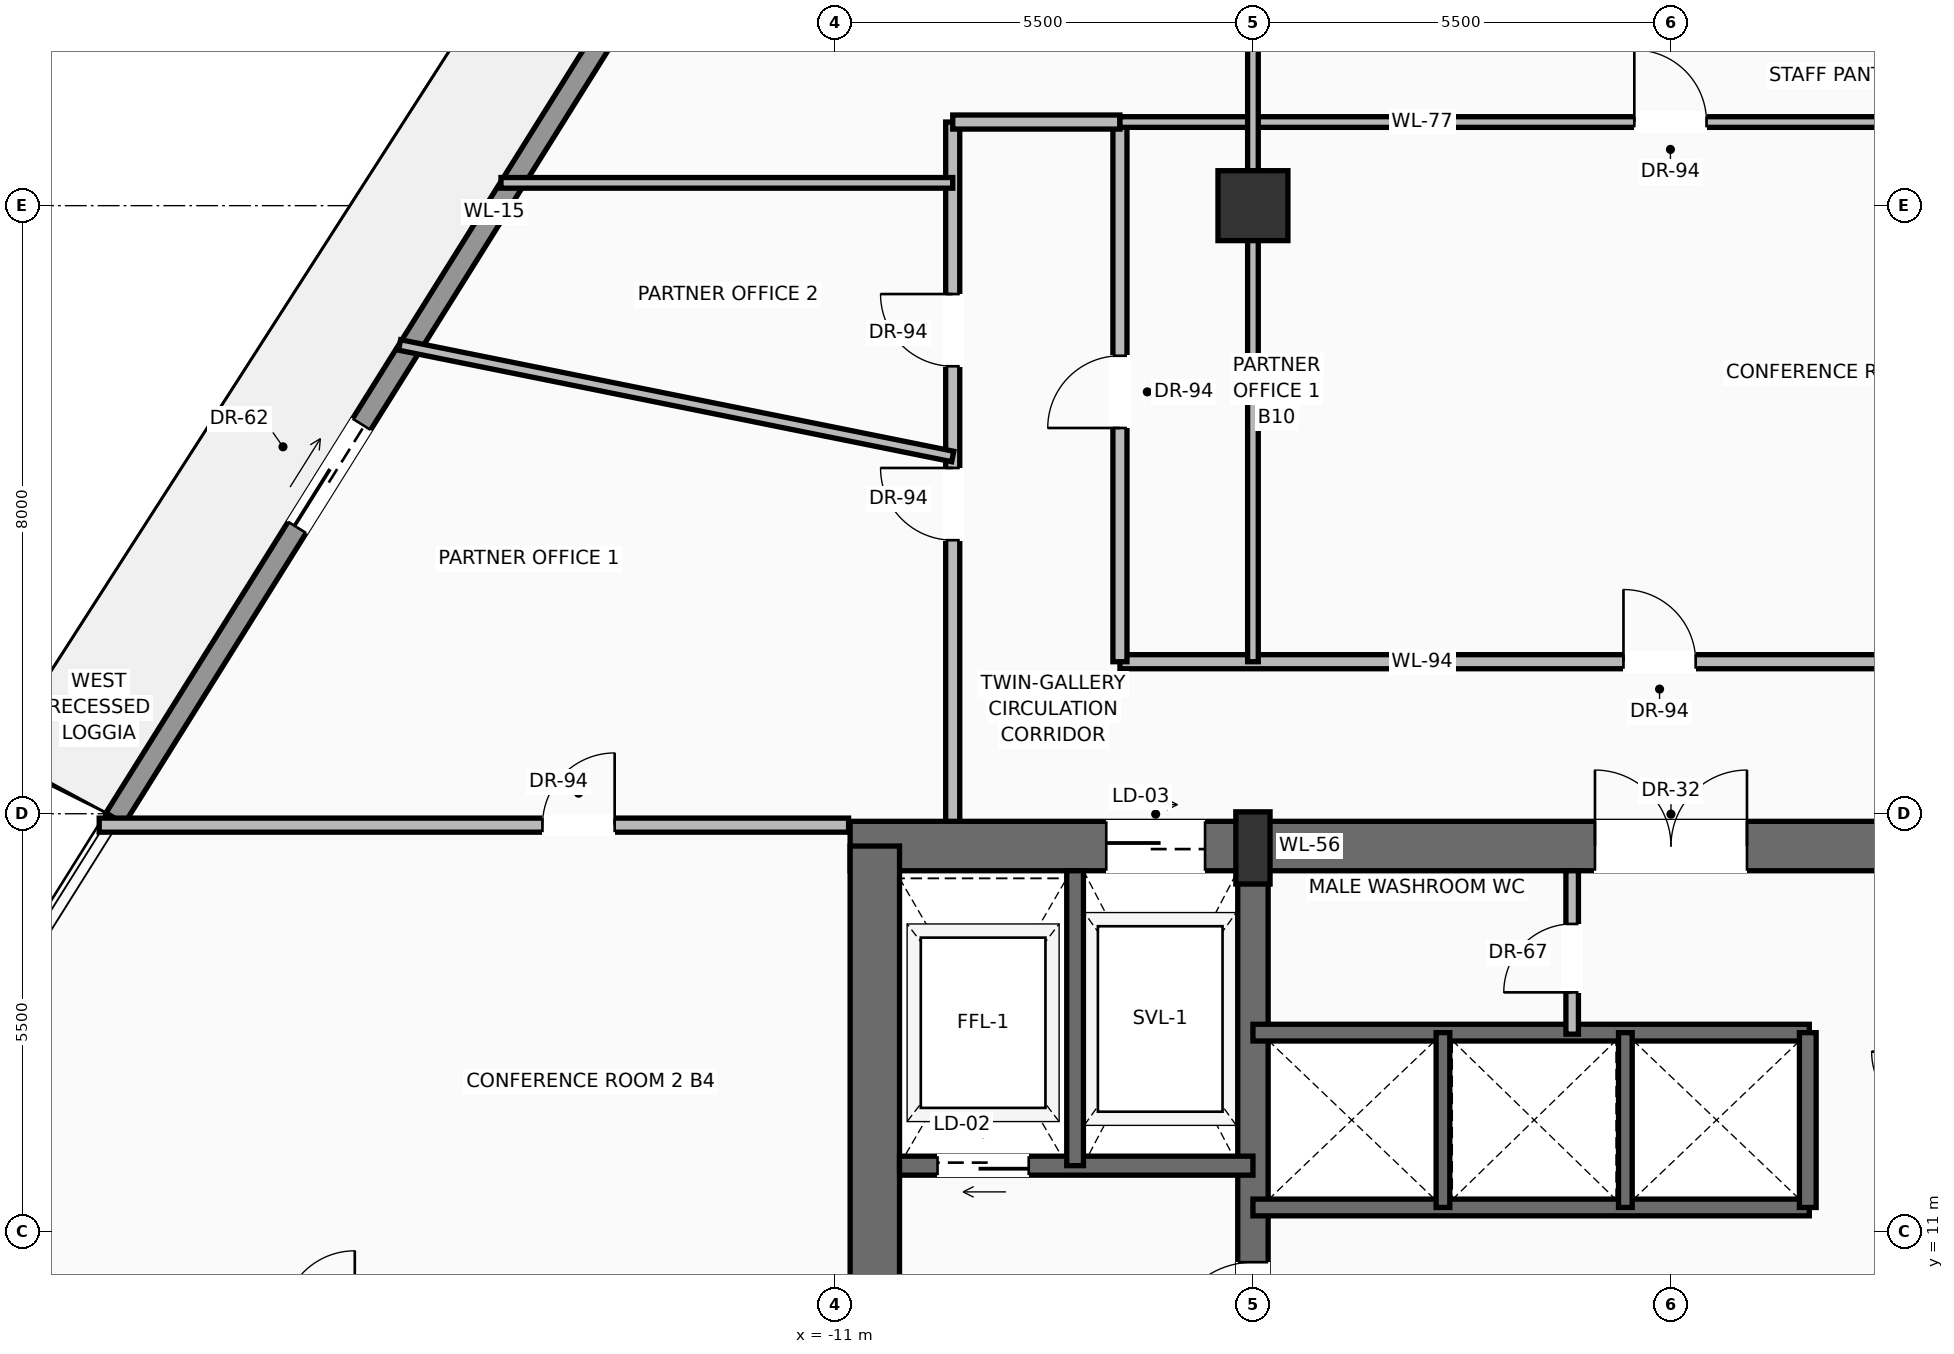
"""IFC4 building model, lengths in metres.
Left out: names, types, materials, properties, quantities, classifications, styles, units other than length and angle.
Written with IfcOpenShell. Run it as: python <this file> out.ifc"""

import sys

from ifc_helpers import new_model, si_unit, direction, frame, frame_2d, origin, origin_2d, place, context, subcontext, project, spatial, rectangle, extrude, source, transform, mapped, element, fill, save


model = new_model("IFC4")
c1 = context("Model", 3, precision=1e-05, world=origin(), true_north=direction((0.0, 1.0)))
c2 = subcontext(c1, "Body", "Model", "MODEL_VIEW")
j1 = project(units=[si_unit("LENGTHUNIT", "METRE"), si_unit("PLANEANGLEUNIT", "RADIAN")], contexts=[c1])
p1 = place(None, origin())
s1 = spatial("IfcSite", under=j1, at=p1, CompositionType="ELEMENT")
p2 = place(p1, origin())
s2 = spatial("IfcBuilding", under=s1, at=p2, CompositionType="ELEMENT")
p3 = place(p2, frame((0.0, 0.0, 178.4)))
s3 = spatial("IfcBuildingStorey", under=s2, at=p3, CompositionType="ELEMENT", Elevation=178.4)
p4 = place(p3, frame((-10.8, 16.075, 0.0), z_axis=(0.0, 0.0, 1.0), x_axis=(1.0, 0.0, 0.0)))
e1 = element("IfcWall", 1, at=p4, inside=s3, PredefinedType="SHEAR", context=c2, shape_type="SweptSolid", body=[
    extrude(rectangle(XDim=21.6, YDim=0.65, at=frame_2d((10.8, 0.0))), origin(), (0.0, 0.0, 1.0), 3.47),
])
p5 = place(p4, frame((3.37, 0.0, 0.0)))
e2 = element("IfcOpeningElement", 2, at=p5, cuts=e1, PredefinedType="OPENING", context=c2, shape_type="SweptSolid", body=[
    extrude(rectangle(XDim=1.3, YDim=2.3, at=frame_2d((0.65, 1.15))), frame((0.0, 0.335, 0.0), z_axis=(0.0, -1.0, 0.0), x_axis=(1.0, 0.0, 0.0)), (0.0, 0.0, 1.0), 0.67),
])
p6 = place(p4, frame((9.8, 0.0, 0.0)))
e3 = element("IfcOpeningElement", 3, at=p6, cuts=e1, PredefinedType="OPENING", context=c2, shape_type="SweptSolid", body=[
    extrude(rectangle(XDim=2.0, YDim=2.4, at=frame_2d((1.0, 1.2))), frame((0.0, 0.335, 0.0), z_axis=(0.0, -1.0, 0.0), x_axis=(1.0, 0.0, 0.0)), (0.0, 0.0, 1.0), 0.67),
])
p7 = place(p3, frame((-10.475, 0.525, 0.0), z_axis=(0.0, 0.0, 1.0), x_axis=(0.0, 1.0, 0.0)))
e4 = element("IfcWall", 4, at=p7, inside=s3, PredefinedType="SHEAR", context=c2, shape_type="SweptSolid", body=[
    extrude(rectangle(XDim=15.55, YDim=0.65, at=frame_2d((7.775, 0.0))), origin(), (0.0, 0.0, 1.0), 3.47),
])
p8 = place(p3, frame((-5.5, 0.525, 0.0), z_axis=(0.0, 0.0, 1.0), x_axis=(0.0, 1.0, 0.0)))
e5 = element("IfcWall", 5, at=p8, inside=s3, PredefinedType="SHEAR", context=c2, shape_type="SweptSolid", body=[
    extrude(rectangle(XDim=15.55, YDim=0.4, at=frame_2d((7.775, 0.0))), origin(), (0.0, 0.0, 1.0), 3.47),
])
p9 = place(p8, frame((8.975, 0.0, 0.0)))
e6 = element("IfcOpeningElement", 6, at=p9, cuts=e5, PredefinedType="OPENING", context=c2, shape_type="SweptSolid", body=[
    extrude(rectangle(XDim=1.1, YDim=2.2, at=frame_2d((0.55, 1.1))), frame((0.0, 0.21, 0.0), z_axis=(0.0, -1.0, 0.0), x_axis=(1.0, 0.0, 0.0)), (0.0, 0.0, 1.0), 0.42),
])
m1 = source(origin(), c2, "Body", "SweptSolid", [
    extrude(rectangle(XDim=0.45, YDim=0.95, at=origin_2d()), origin(), (0.0, 0.0, 1.0), 3.7),
])
p10 = place(p3, frame((-5.5, 16.05, 0.0), z_axis=(0.0, 0.0, 1.0), x_axis=(1.0, 0.0, 0.0)))
e7 = element("IfcColumn", 7, at=p10, inside=s3, PredefinedType="PILASTER", context=c2, shape_type="MappedRepresentation", body=[
    mapped(m1, transform((0.0, 0.0, 0.0), scale=1.0)),
])
m2 = source(origin(), c2, "Body", "SweptSolid", [
    extrude(rectangle(XDim=0.92, YDim=0.92, at=origin_2d()), origin(), (0.0, 0.0, 1.0), 3.7),
])
p11 = place(p3, frame((-5.5, 24.5, 0.0), z_axis=(0.0, 0.0, 1.0), x_axis=(1.0, 0.0, 0.0)))
e8 = element("IfcColumn", 8, at=p11, inside=s3, PredefinedType="COLUMN", context=c2, shape_type="MappedRepresentation", body=[
    mapped(m2, transform((0.0, 0.0, 0.0), scale=1.0)),
])
p12 = place(p3, frame((-20.471, 16.438, 0.0), z_axis=(0.0, 0.0, 1.0), x_axis=(0.530368533609, 0.847767195967, 0.0)))
e9 = element("IfcWall", 9, at=p12, inside=s3, PredefinedType="SOLIDWALL", context=c2, shape_type="SweptSolid", body=[
    extrude(rectangle(XDim=18.82, YDim=0.28, at=frame_2d((9.41, 0.0))), origin(), (0.0, 0.0, 1.0), 3.05),
])
p13 = place(p12, frame((4.517, 0.0, 0.0)))
e10 = element("IfcOpeningElement", 10, at=p13, cuts=e9, PredefinedType="OPENING", context=c2, shape_type="SweptSolid", body=[
    extrude(rectangle(XDim=1.6, YDim=2.35, at=frame_2d((0.8, 1.175))), frame((0.0, 0.15, 0.0), z_axis=(0.0, -1.0, 0.0), x_axis=(1.0, 0.0, 0.0)), (0.0, 0.0, 1.0), 0.3),
])
p14 = place(p12, frame((12.798, 0.0, 0.9)))
e11 = element("IfcOpeningElement", 11, at=p14, cuts=e9, PredefinedType="OPENING", context=c2, shape_type="SweptSolid", body=[
    extrude(rectangle(XDim=1.55, YDim=1.85, at=frame_2d((0.775, 0.925))), frame((0.0, 0.15, 0.0), z_axis=(0.0, -1.0, 0.0), x_axis=(1.0, 0.0, 0.0)), (0.0, 0.0, 1.0), 0.3),
])
p15 = place(p3, frame((-5.5, 11.87, 0.0), z_axis=(0.0, 0.0, 1.0), x_axis=(-1.0, 0.0, 0.0)))
e12 = element("IfcWall", 12, at=p15, inside=s3, PredefinedType="SOLIDWALL", context=c2, shape_type="SweptSolid", body=[
    extrude(rectangle(XDim=4.65, YDim=0.25, at=frame_2d((2.325, 0.0))), origin(), (0.0, 0.0, 1.0), 3.47),
])
p16 = place(p15, frame((2.95, 0.0, 0.0)))
e13 = element("IfcOpeningElement", 13, at=p16, cuts=e12, PredefinedType="OPENING", context=c2, shape_type="SweptSolid", body=[
    extrude(rectangle(XDim=1.2, YDim=2.25, at=frame_2d((0.6, 1.125))), frame((0.0, 0.135, 0.0), z_axis=(0.0, -1.0, 0.0), x_axis=(1.0, 0.0, 0.0)), (0.0, 0.0, 1.0), 0.27),
])
p17 = place(p3, frame((-7.84, 11.87, 0.0), z_axis=(0.0, 0.0, 1.0), x_axis=(0.0, 1.0, 0.0)))
e14 = element("IfcWall", 14, at=p17, inside=s3, PredefinedType="SOLIDWALL", context=c2, shape_type="SweptSolid", body=[
    extrude(rectangle(XDim=3.88, YDim=0.22, at=frame_2d((1.94, 0.0))), origin(), (0.0, 0.0, 1.0), 3.47),
])
for number, where, z_axis, x_axis in (
    (15, (-5.5, 11.32, 0.0), (0.0, 0.0, 1.0), (1.0, 0.0, 0.0)),
    (16, (-5.5, 13.62, 0.0), (0.0, 0.0, 1.0), (1.0, 0.0, 0.0)),
):
    element("IfcWall", number, at=place(p3, frame(where, z_axis=z_axis, x_axis=x_axis)), inside=s3, PredefinedType="SOLIDWALL", context=c2, shape_type="SweptSolid", body=[
        extrude(rectangle(XDim=7.32, YDim=0.22, at=frame_2d((3.66, 0.0))), origin(), (0.0, 0.0, 1.0), 3.47),
    ])
p18 = place(p3, frame((1.8, 11.32, 0.0), z_axis=(0.0, 0.0, 1.0), x_axis=(0.0, 1.0, 0.0)))
e17 = element("IfcWall", 17, at=p18, inside=s3, PredefinedType="SOLIDWALL", context=c2, shape_type="SweptSolid", body=[
    extrude(rectangle(XDim=2.3, YDim=0.22, at=frame_2d((1.15, 0.0))), origin(), (0.0, 0.0, 1.0), 3.47),
])
for number, where, z_axis, x_axis in (
    (18, (-3.0, 11.32, 0.0), (0.0, 0.0, 1.0), (0.0, 1.0, 0.0)),
    (19, (-0.6, 11.32, 0.0), (0.0, 0.0, 1.0), (0.0, 1.0, 0.0)),
):
    element("IfcWall", number, at=place(p3, frame(where, z_axis=z_axis, x_axis=x_axis)), inside=s3, PredefinedType="SOLIDWALL", context=c2, shape_type="SweptSolid", body=[
        extrude(rectangle(XDim=2.3, YDim=0.18, at=frame_2d((1.15, 0.0))), origin(), (0.0, 0.0, 1.0), 3.47),
    ])
p19 = place(p3, frame((-1.3, 13.6, 0.0), z_axis=(0.0, 0.0, 1.0), x_axis=(0.0, 1.0, 0.0)))
e20 = element("IfcWall", 20, at=p19, inside=s3, PredefinedType="PARTITIONING", context=c2, shape_type="SweptSolid", body=[
    extrude(rectangle(XDim=2.15, YDim=0.165, at=frame_2d((1.075, 0.0))), origin(), (0.0, 0.0, 1.0), 3.462),
])
p20 = place(p19, frame((0.55, 0.0, 0.0)))
e21 = element("IfcOpeningElement", 21, at=p20, cuts=e20, PredefinedType="OPENING", context=c2, shape_type="SweptSolid", body=[
    extrude(rectangle(XDim=0.9, YDim=2.1, at=frame_2d((0.45, 1.05))), frame((0.0, 0.093, 0.0), z_axis=(0.0, -1.0, 0.0), x_axis=(1.0, 0.0, 0.0)), (0.0, 0.0, 1.0), 0.185),
])
p21 = place(p3, frame((-7.25, 18.5, 0.0), z_axis=(0.0, 0.0, 1.0), x_axis=(1.0, 0.0, 0.0)))
e22 = element("IfcWall", 22, at=p21, inside=s3, PredefinedType="PARTITIONING", context=c2, shape_type="SweptSolid", body=[
    extrude(rectangle(XDim=14.2, YDim=0.185, at=frame_2d((7.1, 0.0))), origin(), (0.0, 0.0, 1.0), 2.846),
])
p22 = place(p21, frame((6.625, 0.0, 0.0)))
e23 = element("IfcOpeningElement", 23, at=p22, cuts=e22, PredefinedType="OPENING", context=c2, shape_type="SweptSolid", body=[
    extrude(rectangle(XDim=0.95, YDim=2.2, at=frame_2d((0.475, 1.1))), frame((0.0, 0.103, 0.0), z_axis=(0.0, -1.0, 0.0), x_axis=(1.0, 0.0, 0.0)), (0.0, 0.0, 1.0), 0.205),
])
p23 = place(p3, frame((-7.25, 18.5, 0.0), z_axis=(0.0, 0.0, 1.0), x_axis=(0.0, 1.0, 0.0)))
e24 = element("IfcWall", 24, at=p23, inside=s3, PredefinedType="PARTITIONING", context=c2, shape_type="SweptSolid", body=[
    extrude(rectangle(XDim=7.1, YDim=0.185, at=frame_2d((3.55, 0.0))), origin(), (0.0, 0.0, 1.0), 2.846),
])
p24 = place(p23, frame((3.075, 0.0, 0.0)))
e25 = element("IfcOpeningElement", 25, at=p24, cuts=e24, PredefinedType="OPENING", context=c2, shape_type="SweptSolid", body=[
    extrude(rectangle(XDim=0.95, YDim=2.2, at=frame_2d((0.475, 1.1))), frame((0.0, 0.103, 0.0), z_axis=(0.0, -1.0, 0.0), x_axis=(1.0, 0.0, 0.0)), (0.0, 0.0, 1.0), 0.205),
])
p25 = place(p3, frame((-9.45, 16.4, 0.0), z_axis=(0.0, 0.0, 1.0), x_axis=(0.0, 1.0, 0.0)))
e26 = element("IfcWall", 26, at=p25, inside=s3, PredefinedType="PARTITIONING", context=c2, shape_type="SweptSolid", body=[
    extrude(rectangle(XDim=9.2, YDim=0.185, at=frame_2d((4.6, 0.0))), origin(), (0.0, 0.0, 1.0), 2.846),
])
p26 = place(p25, frame((3.699, 0.0, 0.0)))
e27 = element("IfcOpeningElement", 27, at=p26, cuts=e26, PredefinedType="OPENING", context=c2, shape_type="SweptSolid", body=[
    extrude(rectangle(XDim=0.95, YDim=2.2, at=frame_2d((0.475, 1.1))), frame((0.0, 0.103, 0.0), z_axis=(0.0, -1.0, 0.0), x_axis=(1.0, 0.0, 0.0)), (0.0, 0.0, 1.0), 0.205),
])
p27 = place(p25, frame((5.987, 0.0, 0.0)))
e28 = element("IfcOpeningElement", 28, at=p27, cuts=e26, PredefinedType="OPENING", context=c2, shape_type="SweptSolid", body=[
    extrude(rectangle(XDim=0.95, YDim=2.2, at=frame_2d((0.475, 1.1))), frame((0.0, 0.103, 0.0), z_axis=(0.0, -1.0, 0.0), x_axis=(1.0, 0.0, 0.0)), (0.0, 0.0, 1.0), 0.205),
])
p28 = place(p3, frame((-9.45, 25.6, 0.0), z_axis=(0.0, 0.0, 1.0), x_axis=(1.0, 0.0, 0.0)))
e29 = element("IfcWall", 29, at=p28, inside=s3, PredefinedType="PARTITIONING", context=c2, shape_type="SweptSolid", body=[
    extrude(rectangle(XDim=2.2, YDim=0.185, at=frame_2d((1.1, 0.0))), origin(), (0.0, 0.0, 1.0), 3.462),
])
p29 = place(p3, frame((-20.68, 16.35, 0.0), z_axis=(0.0, 0.0, 1.0), x_axis=(1.0, 0.0, 0.0)))
e30 = element("IfcWall", 30, at=p29, inside=s3, PredefinedType="PARTITIONING", context=c2, shape_type="SweptSolid", body=[
    extrude(rectangle(XDim=9.86, YDim=0.185, at=frame_2d((4.93, 0.0))), origin(), (0.0, 0.0, 1.0), 3.462),
])
p30 = place(p29, frame((5.832, 0.0, 0.0)))
e31 = element("IfcOpeningElement", 31, at=p30, cuts=e30, PredefinedType="OPENING", context=c2, shape_type="SweptSolid", body=[
    extrude(rectangle(XDim=0.95, YDim=2.2, at=frame_2d((0.475, 1.1))), frame((0.0, 0.103, 0.0), z_axis=(0.0, -1.0, 0.0), x_axis=(1.0, 0.0, 0.0)), (0.0, 0.0, 1.0), 0.205),
])
p31 = place(p3, frame((-7.25, 25.6, 0.0), z_axis=(0.0, 0.0, 1.0), x_axis=(1.0, 0.0, 0.0)))
e32 = element("IfcWall", 32, at=p31, inside=s3, PredefinedType="PARTITIONING", context=c2, shape_type="SweptSolid", body=[
    extrude(rectangle(XDim=14.2, YDim=0.14, at=frame_2d((7.1, 0.0))), origin(), (0.0, 0.0, 1.0), 3.462),
])
p32 = place(p31, frame((6.768, 0.0, 0.0)))
e33 = element("IfcOpeningElement", 33, at=p32, cuts=e32, PredefinedType="OPENING", context=c2, shape_type="SweptSolid", body=[
    extrude(rectangle(XDim=0.95, YDim=2.2, at=frame_2d((0.475, 1.1))), frame((0.0, 0.08, 0.0), z_axis=(0.0, -1.0, 0.0), x_axis=(1.0, 0.0, 0.0)), (0.0, 0.0, 1.0), 0.16),
])
p33 = place(p3, frame((-5.5, 18.5, 0.0), z_axis=(0.0, 0.0, 1.0), x_axis=(0.0, 1.0, 0.0)))
e34 = element("IfcWall", 34, at=p33, inside=s3, PredefinedType="PARTITIONING", context=c2, shape_type="SweptSolid", body=[
    extrude(rectangle(XDim=14.0, YDim=0.14, at=frame_2d((7.0, 0.0))), origin(), (0.0, 0.0, 1.0), 2.846),
])
p34 = place(p3, frame((-16.728, 22.667, 0.0), z_axis=(0.0, 0.0, 1.0), x_axis=(0.980268299124, -0.197671600726, 0.0)))
e35 = element("IfcWall", 35, at=p34, inside=s3, PredefinedType="PARTITIONING", context=c2, shape_type="SweptSolid", body=[
    extrude(rectangle(XDim=7.424, YDim=0.14, at=frame_2d((3.712, 0.0))), origin(), (0.0, 0.0, 1.0), 3.049),
])
p35 = place(p3, frame((-15.394, 24.8, 0.0), z_axis=(0.0, 0.0, 1.0), x_axis=(1.0, 0.0, 0.0)))
e36 = element("IfcWall", 36, at=p35, inside=s3, PredefinedType="PARTITIONING", context=c2, shape_type="SweptSolid", body=[
    extrude(rectangle(XDim=5.944, YDim=0.14, at=frame_2d((2.972, 0.0))), origin(), (0.0, 0.0, 1.0), 3.462),
])
m3 = source(origin(), c2, "Body", "SweptSolid", [
    extrude(rectangle(XDim=1.6, YDim=2.35, at=frame_2d((0.8, 1.175))), frame((0.0, 0.025, 0.0), z_axis=(0.0, -1.0, 0.0), x_axis=(1.0, 0.0, 0.0)), (0.0, 0.0, 1.0), 0.05),
])
p36 = place(p13, origin())
e37 = element("IfcDoor", 37, at=p36, inside=s3, OperationType="SLIDING_TO_LEFT", PredefinedType="DOOR", context=c2, shape_type="MappedRepresentation", body=[
    mapped(m3, transform((0.0, 0.0, 0.0), scale=1.0)),
])
fill(e10, e37)
m4 = source(origin(), c2, "Body", "SweptSolid", [
    extrude(rectangle(XDim=1.1, YDim=2.2, at=frame_2d((0.55, 1.1))), frame((0.0, 0.025, 0.0), z_axis=(0.0, -1.0, 0.0), x_axis=(1.0, 0.0, 0.0)), (0.0, 0.0, 1.0), 0.05),
])
p37 = place(p9, origin())
e38 = element("IfcDoor", 38, at=p37, inside=s3, OperationType="SINGLE_SWING_LEFT", PredefinedType="DOOR", context=c2, shape_type="MappedRepresentation", body=[
    mapped(m4, transform((0.0, 0.0, 0.0), scale=1.0)),
])
fill(e6, e38)
m5 = source(origin(), c2, "Body", "SweptSolid", [
    extrude(rectangle(XDim=1.2, YDim=2.25, at=frame_2d((0.6, 1.125))), frame((0.0, 0.025, 0.0), z_axis=(0.0, -1.0, 0.0), x_axis=(1.0, 0.0, 0.0)), (0.0, 0.0, 1.0), 0.05),
])
p38 = place(p16, origin())
e39 = element("IfcDoor", 39, at=p38, inside=s3, OperationType="SLIDING_TO_LEFT", PredefinedType="DOOR", context=c2, shape_type="MappedRepresentation", body=[
    mapped(m5, transform((0.0, 0.0, 0.0), scale=1.0)),
])
fill(e13, e39)
m6 = source(origin(), c2, "Body", "SweptSolid", [
    extrude(rectangle(XDim=1.3, YDim=2.3, at=frame_2d((0.65, 1.15))), frame((0.0, 0.025, 0.0), z_axis=(0.0, -1.0, 0.0), x_axis=(1.0, 0.0, 0.0)), (0.0, 0.0, 1.0), 0.05),
])
p39 = place(p5, origin())
e40 = element("IfcDoor", 40, at=p39, inside=s3, OperationType="SLIDING_TO_RIGHT", PredefinedType="DOOR", context=c2, shape_type="MappedRepresentation", body=[
    mapped(m6, transform((0.0, 0.0, 0.0), scale=1.0)),
])
fill(e2, e40)
m7 = source(origin(), c2, "Body", "SweptSolid", [
    extrude(rectangle(XDim=2.0, YDim=2.4, at=frame_2d((1.0, 1.2))), frame((0.0, 0.025, 0.0), z_axis=(0.0, -1.0, 0.0), x_axis=(1.0, 0.0, 0.0)), (0.0, 0.0, 1.0), 0.05),
])
p40 = place(p6, origin())
e41 = element("IfcDoor", 41, at=p40, inside=s3, OperationType="DOUBLE_DOOR_SINGLE_SWING", PredefinedType="DOOR", context=c2, shape_type="MappedRepresentation", body=[
    mapped(m7, transform((0.0, 0.0, 0.0), scale=1.0)),
])
fill(e3, e41)
m8 = source(origin(), c2, "Body", "SweptSolid", [
    extrude(rectangle(XDim=0.9, YDim=2.1, at=frame_2d((0.45, 1.05))), frame((0.0, 0.025, 0.0), z_axis=(0.0, -1.0, 0.0), x_axis=(1.0, 0.0, 0.0)), (0.0, 0.0, 1.0), 0.05),
])
p41 = place(p20, origin())
e42 = element("IfcDoor", 42, at=p41, inside=s3, OperationType="SINGLE_SWING_LEFT", PredefinedType="DOOR", context=c2, shape_type="MappedRepresentation", body=[
    mapped(m8, transform((0.0, 0.0, 0.0), scale=1.0)),
])
fill(e21, e42)
m9 = source(origin(), c2, "Body", "SweptSolid", [
    extrude(rectangle(XDim=0.95, YDim=2.2, at=frame_2d((0.475, 1.1))), frame((0.0, 0.025, 0.0), z_axis=(0.0, -1.0, 0.0), x_axis=(1.0, 0.0, 0.0)), (0.0, 0.0, 1.0), 0.05),
])
p42 = place(p22, origin())
e43 = element("IfcDoor", 43, at=p42, inside=s3, OperationType="SINGLE_SWING_LEFT", PredefinedType="DOOR", context=c2, shape_type="MappedRepresentation", body=[
    mapped(m9, transform((0.0, 0.0, 0.0), scale=1.0)),
])
fill(e23, e43)
p43 = place(p26, origin())
e44 = element("IfcDoor", 44, at=p43, inside=s3, OperationType="SINGLE_SWING_RIGHT", PredefinedType="DOOR", context=c2, shape_type="MappedRepresentation", body=[
    mapped(m9, transform((0.0, 0.0, 0.0), scale=1.0)),
])
fill(e27, e44)
p44 = place(p30, origin())
e45 = element("IfcDoor", 45, at=p44, inside=s3, OperationType="SINGLE_SWING_RIGHT", PredefinedType="DOOR", context=c2, shape_type="MappedRepresentation", body=[
    mapped(m9, transform((0.0, 0.0, 0.0), scale=1.0)),
])
fill(e31, e45)
p45 = place(p24, origin())
e46 = element("IfcDoor", 46, at=p45, inside=s3, OperationType="SINGLE_SWING_LEFT", PredefinedType="DOOR", context=c2, shape_type="MappedRepresentation", body=[
    mapped(m9, transform((0.0, 0.0, 0.0), scale=1.0)),
])
fill(e25, e46)
p46 = place(p27, origin())
e47 = element("IfcDoor", 47, at=p46, inside=s3, OperationType="SINGLE_SWING_RIGHT", PredefinedType="DOOR", context=c2, shape_type="MappedRepresentation", body=[
    mapped(m9, transform((0.0, 0.0, 0.0), scale=1.0)),
])
fill(e28, e47)
p47 = place(p32, origin())
e48 = element("IfcDoor", 48, at=p47, inside=s3, OperationType="SINGLE_SWING_LEFT", PredefinedType="DOOR", context=c2, shape_type="MappedRepresentation", body=[
    mapped(m9, transform((0.0, 0.0, 0.0), scale=1.0)),
])
fill(e33, e48)
save(model, sys.argv[1])
